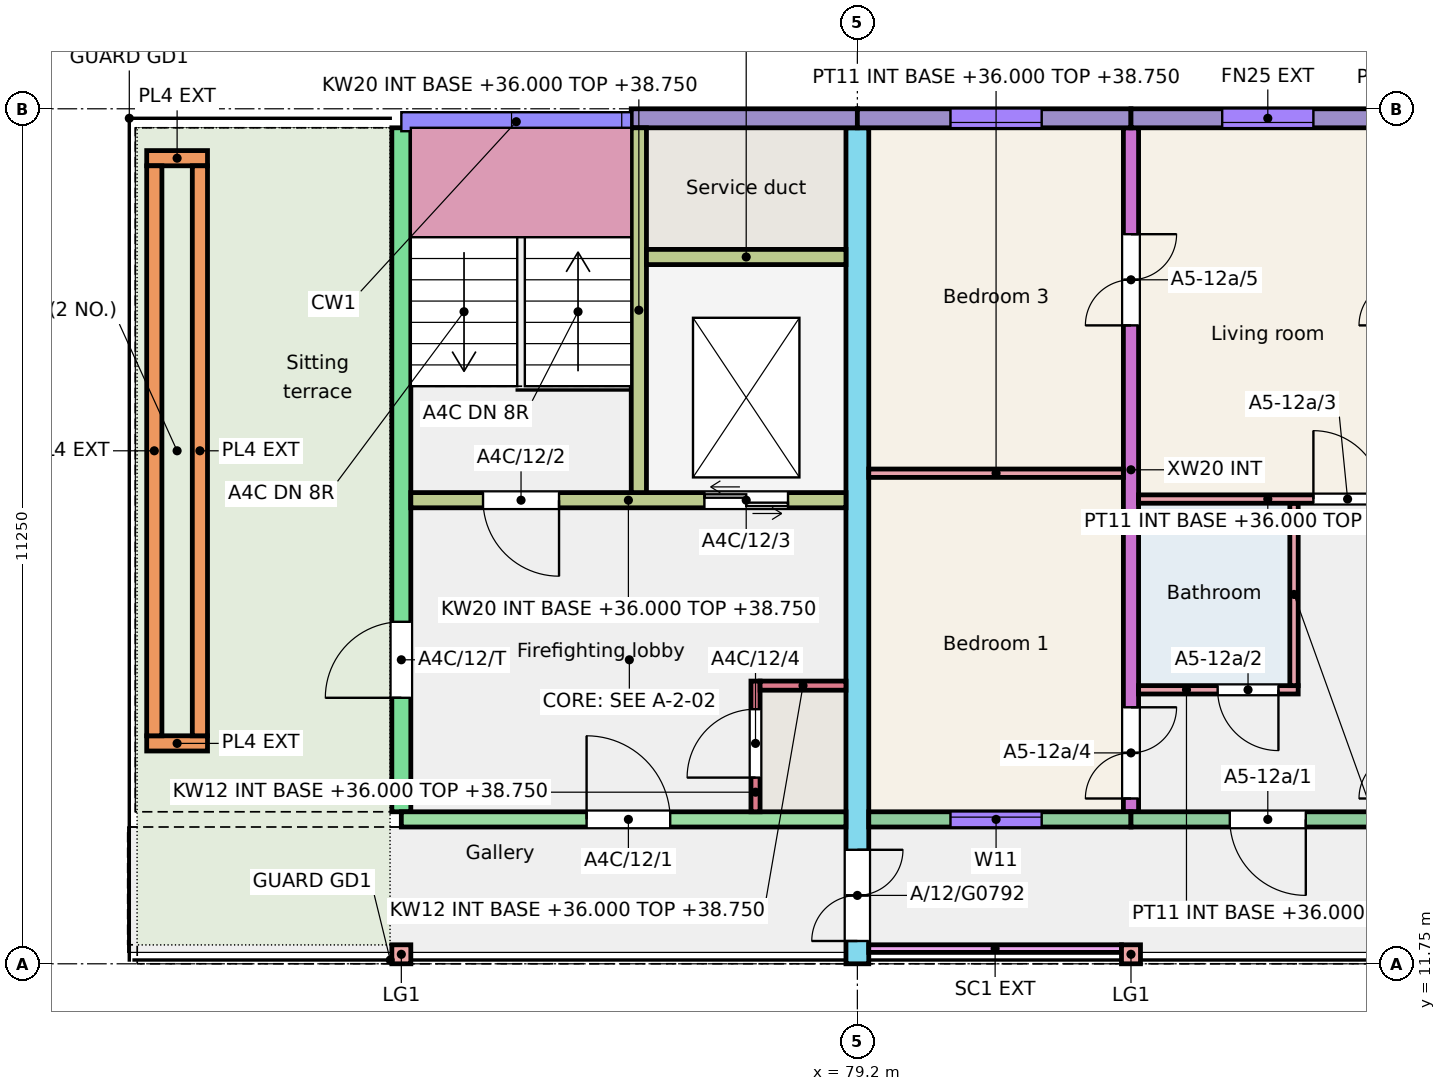
"""IFC4 building model, lengths in metres.
Left out: names, types, materials, properties, quantities, classifications, styles, units other than length and angle.
Written with IfcOpenShell. Run it as: python <this file> out.ifc"""

import sys

from ifc_helpers import new_model, si_unit, direction, frame, frame_2d, origin, origin_2d, place, context, subcontext, project, spatial, rectangle, extrude, element, fill, save


model = new_model("IFC4")
c1 = context("Model", 3, precision=1e-05, world=origin(), true_north=direction((0.0, 1.0)))
c2 = subcontext(c1, "Body", "Model", "MODEL_VIEW")
j1 = project(units=[si_unit("LENGTHUNIT", "METRE"), si_unit("PLANEANGLEUNIT", "RADIAN")], contexts=[c1])
p1 = place(None, origin())
s1 = spatial("IfcSite", under=j1, at=p1, CompositionType="ELEMENT")
p2 = place(p1, origin())
s2 = spatial("IfcBuilding", under=s1, at=p2, CompositionType="ELEMENT")
p3 = place(p2, frame((0.0, 0.0, 36.0)))
s3 = spatial("IfcBuildingStorey", under=s2, at=p3, CompositionType="ELEMENT", Elevation=36.0)
p4 = place(p3, frame((73.2, 13.75, 0.0), z_axis=(0.0, 0.0, 1.0), x_axis=(0.0, 1.0, 0.0)))
e1 = element("IfcWall", 1, at=p4, inside=s3, PredefinedType="SHEAR", context=c2, shape_type="SweptSolid", body=[
    extrude(rectangle(XDim=9.0, YDim=0.25, at=frame_2d((4.5, 0.0))), origin(), (0.0, 0.0, 1.0), 3.0),
])
p5 = place(p4, frame((1.5, 0.0, 0.0)))
e2 = element("IfcOpeningElement", 2, at=p5, cuts=e1, PredefinedType="OPENING", context=c2, shape_type="SweptSolid", body=[
    extrude(rectangle(XDim=1.0, YDim=2.1, at=frame_2d((0.5, 1.05))), frame((0.0, 0.135, 0.0), z_axis=(0.0, -1.0, 0.0), x_axis=(1.0, 0.0, 0.0)), (0.0, 0.0, 1.0), 0.27),
])
p6 = place(p3, frame((79.2, 11.75, 0.0), z_axis=(0.0, 0.0, 1.0), x_axis=(0.0, 1.0, 0.0)))
e3 = element("IfcWall", 3, at=p6, inside=s3, PredefinedType="SHEAR", context=c2, shape_type="SweptSolid", body=[
    extrude(rectangle(XDim=11.0, YDim=0.3, at=frame_2d((5.5, 0.0))), origin(), (0.0, 0.0, 1.0), 3.0),
])
p7 = place(p6, frame((0.3, 0.0, 0.0)))
e4 = element("IfcOpeningElement", 4, at=p7, cuts=e3, PredefinedType="OPENING", context=c2, shape_type="SweptSolid", body=[
    extrude(rectangle(XDim=1.2, YDim=2.1, at=frame_2d((0.6, 1.05))), frame((0.0, 0.16, 0.0), z_axis=(0.0, -1.0, 0.0), x_axis=(1.0, 0.0, 0.0)), (0.0, 0.0, 1.0), 0.32),
])
p8 = place(p3, frame((82.8, 13.75, 0.0), z_axis=(0.0, 0.0, 1.0), x_axis=(0.0, 1.0, 0.0)))
e5 = element("IfcWall", 5, at=p8, inside=s3, PredefinedType="SHEAR", context=c2, shape_type="SweptSolid", body=[
    extrude(rectangle(XDim=9.0, YDim=0.2, at=frame_2d((4.5, 0.0))), origin(), (0.0, 0.0, 1.0), 3.0),
])
p9 = place(p8, frame((0.175, 0.0, 0.0)))
e6 = element("IfcOpeningElement", 6, at=p9, cuts=e5, PredefinedType="OPENING", context=c2, shape_type="SweptSolid", body=[
    extrude(rectangle(XDim=1.2, YDim=2.1, at=frame_2d((0.6, 1.05))), frame((0.0, 0.11, 0.0), z_axis=(0.0, -1.0, 0.0), x_axis=(1.0, 0.0, 0.0)), (0.0, 0.0, 1.0), 0.22),
])
p10 = place(p8, frame((6.4, 0.0, 0.0)))
e7 = element("IfcOpeningElement", 7, at=p10, cuts=e5, PredefinedType="OPENING", context=c2, shape_type="SweptSolid", body=[
    extrude(rectangle(XDim=1.2, YDim=2.1, at=frame_2d((0.6, 1.05))), frame((0.0, 0.11, 0.0), z_axis=(0.0, -1.0, 0.0), x_axis=(1.0, 0.0, 0.0)), (0.0, 0.0, 1.0), 0.22),
])
p11 = place(p3, frame((76.225, 22.875, 0.0), z_axis=(0.0, 0.0, 1.0), x_axis=(1.0, 0.0, 0.0)))
e8 = element("IfcWall", 8, at=p11, inside=s3, PredefinedType="SOLIDWALL", context=c2, shape_type="SweptSolid", body=[
    extrude(rectangle(XDim=2.975, YDim=0.25, at=frame_2d((1.487, 0.0))), origin(), (0.0, 0.0, 1.0), 3.0),
])
p12 = place(p3, frame((73.2, 13.65, 0.0), z_axis=(0.0, 0.0, 1.0), x_axis=(1.0, 0.0, 0.0)))
e9 = element("IfcWall", 9, at=p12, inside=s3, PredefinedType="SHEAR", context=c2, shape_type="SweptSolid", body=[
    extrude(rectangle(XDim=5.85, YDim=0.2, at=frame_2d((2.925, 0.0))), origin(), (0.0, 0.0, 1.0), 2.75),
])
p13 = place(p12, frame((2.438, 0.0, 0.0)))
e10 = element("IfcOpeningElement", 10, at=p13, cuts=e9, PredefinedType="OPENING", context=c2, shape_type="SweptSolid", body=[
    extrude(rectangle(XDim=1.1, YDim=2.1, at=frame_2d((0.55, 1.05))), frame((0.0, 0.11, 0.0), z_axis=(0.0, -1.0, 0.0), x_axis=(1.0, 0.0, 0.0)), (0.0, 0.0, 1.0), 0.22),
])
p14 = place(p3, frame((73.325, 17.85, 0.0), z_axis=(0.0, 0.0, 1.0), x_axis=(1.0, 0.0, 0.0)))
e11 = element("IfcWall", 11, at=p14, inside=s3, PredefinedType="SHEAR", context=c2, shape_type="SweptSolid", body=[
    extrude(rectangle(XDim=5.725, YDim=0.2, at=frame_2d((2.863, 0.0))), origin(), (0.0, 0.0, 1.0), 2.75),
])
p15 = place(p14, frame((0.95, 0.0, 0.0)))
e12 = element("IfcOpeningElement", 12, at=p15, cuts=e11, PredefinedType="OPENING", context=c2, shape_type="SweptSolid", body=[
    extrude(rectangle(XDim=1.0, YDim=2.1, at=frame_2d((0.5, 1.05))), frame((0.0, 0.11, 0.0), z_axis=(0.0, -1.0, 0.0), x_axis=(1.0, 0.0, 0.0)), (0.0, 0.0, 1.0), 0.22),
])
p16 = place(p14, frame((3.863, 0.0, 0.0)))
e13 = element("IfcOpeningElement", 13, at=p16, cuts=e11, PredefinedType="OPENING", context=c2, shape_type="SweptSolid", body=[
    extrude(rectangle(XDim=1.1, YDim=2.1, at=frame_2d((0.55, 1.05))), frame((0.0, 0.11, 0.0), z_axis=(0.0, -1.0, 0.0), x_axis=(1.0, 0.0, 0.0)), (0.0, 0.0, 1.0), 0.22),
])
p17 = place(p3, frame((76.325, 17.95, 0.0), z_axis=(0.0, 0.0, 1.0), x_axis=(0.0, 1.0, 0.0)))
e14 = element("IfcWall", 14, at=p17, inside=s3, PredefinedType="SHEAR", context=c2, shape_type="SweptSolid", body=[
    extrude(rectangle(XDim=4.8, YDim=0.2, at=frame_2d((2.4, 0.0))), origin(), (0.0, 0.0, 1.0), 2.75),
])
p18 = place(p3, frame((76.425, 21.05, 0.0), z_axis=(0.0, 0.0, 1.0), x_axis=(1.0, 0.0, 0.0)))
e15 = element("IfcWall", 15, at=p18, inside=s3, PredefinedType="SHEAR", context=c2, shape_type="SweptSolid", body=[
    extrude(rectangle(XDim=2.625, YDim=0.2, at=frame_2d((1.312, 0.0))), origin(), (0.0, 0.0, 1.0), 2.75),
])
p19 = place(p3, frame((77.86, 13.75, 0.0), z_axis=(0.0, 0.0, 1.0), x_axis=(0.0, 1.0, 0.0)))
e16 = element("IfcWall", 16, at=p19, inside=s3, PredefinedType="SHEAR", context=c2, shape_type="SweptSolid", body=[
    extrude(rectangle(XDim=1.72, YDim=0.12, at=frame_2d((0.86, 0.0))), origin(), (0.0, 0.0, 1.0), 2.75),
])
p20 = place(p19, frame((0.45, 0.0, 0.0)))
e17 = element("IfcOpeningElement", 17, at=p20, cuts=e16, PredefinedType="OPENING", context=c2, shape_type="SweptSolid", body=[
    extrude(rectangle(XDim=0.9, YDim=2.1, at=frame_2d((0.45, 1.05))), frame((0.0, 0.07, 0.0), z_axis=(0.0, -1.0, 0.0), x_axis=(1.0, 0.0, 0.0)), (0.0, 0.0, 1.0), 0.14),
])
p21 = place(p3, frame((77.92, 15.41, 0.0), z_axis=(0.0, 0.0, 1.0), x_axis=(1.0, 0.0, 0.0)))
e18 = element("IfcWall", 18, at=p21, inside=s3, PredefinedType="SHEAR", context=c2, shape_type="SweptSolid", body=[
    extrude(rectangle(XDim=1.13, YDim=0.12, at=frame_2d((0.565, 0.0))), origin(), (0.0, 0.0, 1.0), 2.75),
])
p22 = place(p3, frame((79.2, 22.875, 0.0), z_axis=(0.0, 0.0, 1.0), x_axis=(1.0, 0.0, 0.0)))
e19 = element("IfcWall", 19, at=p22, inside=s3, PredefinedType="SOLIDWALL", context=c2, shape_type="SweptSolid", body=[
    extrude(rectangle(XDim=3.6, YDim=0.25, at=frame_2d((1.8, 0.0))), origin(), (0.0, 0.0, 1.0), 3.0),
])
p23 = place(p22, frame((1.225, 0.0, 0.8)))
e20 = element("IfcOpeningElement", 20, at=p23, cuts=e19, PredefinedType="OPENING", context=c2, shape_type="SweptSolid", body=[
    extrude(rectangle(XDim=1.2, YDim=1.6, at=frame_2d((0.6, 0.8))), frame((0.0, 0.135, 0.0), z_axis=(0.0, -1.0, 0.0), x_axis=(1.0, 0.0, 0.0)), (0.0, 0.0, 1.0), 0.27),
])
p24 = place(p3, frame((79.35, 13.65, 0.0), z_axis=(0.0, 0.0, 1.0), x_axis=(1.0, 0.0, 0.0)))
e21 = element("IfcWall", 21, at=p24, inside=s3, PredefinedType="SOLIDWALL", context=c2, shape_type="SweptSolid", body=[
    extrude(rectangle(XDim=3.45, YDim=0.2, at=frame_2d((1.725, 0.0))), origin(), (0.0, 0.0, 1.0), 3.0),
])
p25 = place(p24, frame((1.075, 0.0, 0.8)))
e22 = element("IfcOpeningElement", 22, at=p25, cuts=e21, PredefinedType="OPENING", context=c2, shape_type="SweptSolid", body=[
    extrude(rectangle(XDim=1.2, YDim=1.6, at=frame_2d((0.6, 0.8))), frame((0.0, 0.11, 0.0), z_axis=(0.0, -1.0, 0.0), x_axis=(1.0, 0.0, 0.0)), (0.0, 0.0, 1.0), 0.22),
])
p26 = place(p3, frame((82.8, 22.875, 0.0), z_axis=(0.0, 0.0, 1.0), x_axis=(1.0, 0.0, 0.0)))
e23 = element("IfcWall", 23, at=p26, inside=s3, PredefinedType="SOLIDWALL", context=c2, shape_type="SweptSolid", body=[
    extrude(rectangle(XDim=3.6, YDim=0.25, at=frame_2d((1.8, 0.0))), origin(), (0.0, 0.0, 1.0), 3.0),
])
p27 = place(p26, frame((1.2, 0.0, 0.8)))
e24 = element("IfcOpeningElement", 24, at=p27, cuts=e23, PredefinedType="OPENING", context=c2, shape_type="SweptSolid", body=[
    extrude(rectangle(XDim=1.2, YDim=1.6, at=frame_2d((0.6, 0.8))), frame((0.0, 0.135, 0.0), z_axis=(0.0, -1.0, 0.0), x_axis=(1.0, 0.0, 0.0)), (0.0, 0.0, 1.0), 0.27),
])
p28 = place(p3, frame((82.8, 13.65, 0.0), z_axis=(0.0, 0.0, 1.0), x_axis=(1.0, 0.0, 0.0)))
e25 = element("IfcWall", 25, at=p28, inside=s3, PredefinedType="SOLIDWALL", context=c2, shape_type="SweptSolid", body=[
    extrude(rectangle(XDim=3.6, YDim=0.2, at=frame_2d((1.8, 0.0))), origin(), (0.0, 0.0, 1.0), 3.0),
])
p29 = place(p28, frame((1.3, 0.0, 0.0)))
e26 = element("IfcOpeningElement", 26, at=p29, cuts=e25, PredefinedType="OPENING", context=c2, shape_type="SweptSolid", body=[
    extrude(rectangle(XDim=1.0, YDim=2.1, at=frame_2d((0.5, 1.05))), frame((0.0, 0.11, 0.0), z_axis=(0.0, -1.0, 0.0), x_axis=(1.0, 0.0, 0.0)), (0.0, 0.0, 1.0), 0.22),
])
for number, where, z_axis, x_axis in (
    (27, (73.2, 11.875, 0.0), (0.0, 0.0, 1.0), (1.0, 0.0, 0.0)),
    (28, (82.8, 11.875, 0.0), (0.0, 0.0, 1.0), (1.0, 0.0, 0.0)),
):
    element("IfcColumn", number, at=place(p3, frame(where, z_axis=z_axis, x_axis=x_axis)), inside=s3, PredefinedType="COLUMN", context=c2, shape_type="SweptSolid", body=[
        extrude(rectangle(XDim=0.25, YDim=0.25, at=origin_2d()), origin(), (0.0, 0.0, 1.0), 3.0),
    ])
for number, where, z_axis, x_axis in (
    (29, (69.85, 14.65, 0.01), (0.0, 0.0, 1.0), (1.0, 0.0, 0.0)),
    (30, (69.85, 22.35, 0.01), (0.0, 0.0, 1.0), (1.0, 0.0, 0.0)),
):
    element("IfcWall", number, at=place(p3, frame(where, z_axis=z_axis, x_axis=x_axis)), inside=s3, PredefinedType="SOLIDWALL", context=c2, shape_type="SweptSolid", body=[
        extrude(rectangle(XDim=0.8, YDim=0.2, at=frame_2d((0.4, 0.0))), origin(), (0.0, 0.0, 1.0), 0.45),
    ])
for number, where, z_axis, x_axis in (
    (31, (69.95, 14.75, 0.01), (0.0, 0.0, 1.0), (0.0, 1.0, 0.0)),
    (32, (70.55, 14.75, 0.01), (0.0, 0.0, 1.0), (0.0, 1.0, 0.0)),
):
    element("IfcWall", number, at=place(p3, frame(where, z_axis=z_axis, x_axis=x_axis)), inside=s3, PredefinedType="SOLIDWALL", context=c2, shape_type="SweptSolid", body=[
        extrude(rectangle(XDim=7.5, YDim=0.2, at=frame_2d((3.75, 0.0))), origin(), (0.0, 0.0, 1.0), 0.45),
    ])
p30 = place(p3, frame((79.35, 11.95, 0.0), z_axis=(0.0, 0.0, 1.0), x_axis=(1.0, 0.0, 0.0)))
e33 = element("IfcWall", 33, at=p30, inside=s3, PredefinedType="SOLIDWALL", context=c2, shape_type="SweptSolid", body=[
    extrude(rectangle(XDim=3.325, YDim=0.1, at=frame_2d((1.663, 0.0))), origin(), (0.0, 0.0, 1.0), 2.45),
])
p31 = place(p3, frame((82.9, 15.355, 0.0), z_axis=(0.0, 0.0, 1.0), x_axis=(1.0, 0.0, 0.0)))
e34 = element("IfcWall", 34, at=p31, inside=s3, PredefinedType="PARTITIONING", context=c2, shape_type="SweptSolid", body=[
    extrude(rectangle(XDim=2.1, YDim=0.11, at=frame_2d((1.05, 0.0))), origin(), (0.0, 0.0, 1.0), 2.8),
])
p32 = place(p31, frame((1.04, 0.0, 0.0)))
e35 = element("IfcOpeningElement", 35, at=p32, cuts=e34, PredefinedType="OPENING", context=c2, shape_type="SweptSolid", body=[
    extrude(rectangle(XDim=0.8, YDim=2.1, at=frame_2d((0.4, 1.05))), frame((0.0, 0.065, 0.0), z_axis=(0.0, -1.0, 0.0), x_axis=(1.0, 0.0, 0.0)), (0.0, 0.0, 1.0), 0.13),
])
p33 = place(p3, frame((84.945, 15.41, 0.0), z_axis=(0.0, 0.0, 1.0), x_axis=(0.0, 1.0, 0.0)))
e36 = element("IfcWall", 36, at=p33, inside=s3, PredefinedType="PARTITIONING", context=c2, shape_type="SweptSolid", body=[
    extrude(rectangle(XDim=2.4, YDim=0.11, at=frame_2d((1.2, 0.0))), origin(), (0.0, 0.0, 1.0), 2.8),
])
p34 = place(p3, frame((82.9, 17.865, 0.0), z_axis=(0.0, 0.0, 1.0), x_axis=(1.0, 0.0, 0.0)))
e37 = element("IfcWall", 37, at=p34, inside=s3, PredefinedType="PARTITIONING", context=c2, shape_type="SweptSolid", body=[
    extrude(rectangle(XDim=3.4, YDim=0.11, at=frame_2d((1.7, 0.0))), origin(), (0.0, 0.0, 1.0), 2.8),
])
p35 = place(p34, frame((2.3, 0.0, 0.0)))
e38 = element("IfcOpeningElement", 38, at=p35, cuts=e37, PredefinedType="OPENING", context=c2, shape_type="SweptSolid", body=[
    extrude(rectangle(XDim=0.9, YDim=2.1, at=frame_2d((0.45, 1.05))), frame((0.0, 0.065, 0.0), z_axis=(0.0, -1.0, 0.0), x_axis=(1.0, 0.0, 0.0)), (0.0, 0.0, 1.0), 0.13),
])
p36 = place(p3, frame((79.35, 18.205, 0.0), z_axis=(0.0, 0.0, 1.0), x_axis=(1.0, 0.0, 0.0)))
e39 = element("IfcWall", 39, at=p36, inside=s3, PredefinedType="PARTITIONING", context=c2, shape_type="SweptSolid", body=[
    extrude(rectangle(XDim=3.35, YDim=0.11, at=frame_2d((1.675, 0.0))), origin(), (0.0, 0.0, 1.0), 2.75),
])
p37 = place(p25, origin())
e40 = element("IfcWindow", 40, at=p37, inside=s3, PartitioningType="SINGLE_PANEL", PredefinedType="WINDOW", context=c2, shape_type="SweptSolid", body=[
    extrude(rectangle(XDim=1.2, YDim=1.6, at=frame_2d((0.6, 0.8))), frame((0.0, 0.06, 0.0), z_axis=(0.0, -1.0, 0.0), x_axis=(1.0, 0.0, 0.0)), (0.0, 0.0, 1.0), 0.06),
])
fill(e22, e40)
p38 = place(p23, origin())
e41 = element("IfcWindow", 41, at=p38, inside=s3, PartitioningType="SINGLE_PANEL", PredefinedType="WINDOW", context=c2, shape_type="SweptSolid", body=[
    extrude(rectangle(XDim=1.2, YDim=1.6, at=frame_2d((0.6, 0.8))), frame((0.0, -0.025, 0.0), z_axis=(0.0, -1.0, 0.0), x_axis=(1.0, 0.0, 0.0)), (0.0, 0.0, 1.0), 0.06),
])
fill(e20, e41)
p39 = place(p27, origin())
e42 = element("IfcWindow", 42, at=p39, inside=s3, PartitioningType="SINGLE_PANEL", PredefinedType="WINDOW", context=c2, shape_type="SweptSolid", body=[
    extrude(rectangle(XDim=1.2, YDim=1.6, at=frame_2d((0.6, 0.8))), frame((0.0, -0.025, 0.0), z_axis=(0.0, -1.0, 0.0), x_axis=(1.0, 0.0, 0.0)), (0.0, 0.0, 1.0), 0.06),
])
fill(e24, e42)
p40 = place(p29, origin())
e43 = element("IfcDoor", 43, at=p40, inside=s3, OperationType="SINGLE_SWING_RIGHT", PredefinedType="DOOR", context=c2, shape_type="SweptSolid", body=[
    extrude(rectangle(XDim=1.0, YDim=2.1, at=frame_2d((0.5, 1.05))), frame((0.0, 0.025, 0.0), z_axis=(0.0, -1.0, 0.0), x_axis=(1.0, 0.0, 0.0)), (0.0, 0.0, 1.0), 0.05),
])
fill(e26, e43)
p41 = place(p32, origin())
e44 = element("IfcDoor", 44, at=p41, inside=s3, OperationType="SINGLE_SWING_RIGHT", PredefinedType="DOOR", context=c2, shape_type="SweptSolid", body=[
    extrude(rectangle(XDim=0.8, YDim=2.1, at=frame_2d((0.4, 1.05))), frame((0.0, 0.025, 0.0), z_axis=(0.0, -1.0, 0.0), x_axis=(1.0, 0.0, 0.0)), (0.0, 0.0, 1.0), 0.05),
])
fill(e35, e44)
p42 = place(p35, origin())
e45 = element("IfcDoor", 45, at=p42, inside=s3, OperationType="SINGLE_SWING_LEFT", PredefinedType="DOOR", context=c2, shape_type="SweptSolid", body=[
    extrude(rectangle(XDim=0.9, YDim=2.1, at=frame_2d((0.45, 1.05))), frame((0.0, 0.025, 0.0), z_axis=(0.0, -1.0, 0.0), x_axis=(1.0, 0.0, 0.0)), (0.0, 0.0, 1.0), 0.05),
])
fill(e38, e45)
p43 = place(p9, origin())
e46 = element("IfcDoor", 46, at=p43, inside=s3, OperationType="DOUBLE_DOOR_SINGLE_SWING", PredefinedType="DOOR", context=c2, shape_type="SweptSolid", body=[
    extrude(rectangle(XDim=1.2, YDim=2.1, at=frame_2d((0.6, 1.05))), frame((0.0, 0.025, 0.0), z_axis=(0.0, -1.0, 0.0), x_axis=(1.0, 0.0, 0.0)), (0.0, 0.0, 1.0), 0.05),
])
fill(e6, e46)
p44 = place(p10, origin())
e47 = element("IfcDoor", 47, at=p44, inside=s3, OperationType="DOUBLE_DOOR_SINGLE_SWING", PredefinedType="DOOR", context=c2, shape_type="SweptSolid", body=[
    extrude(rectangle(XDim=1.2, YDim=2.1, at=frame_2d((0.6, 1.05))), frame((0.0, 0.025, 0.0), z_axis=(0.0, -1.0, 0.0), x_axis=(1.0, 0.0, 0.0)), (0.0, 0.0, 1.0), 0.05),
])
fill(e7, e47)
p45 = place(p13, origin())
e48 = element("IfcDoor", 48, at=p45, inside=s3, OperationType="SINGLE_SWING_LEFT", PredefinedType="DOOR", context=c2, shape_type="SweptSolid", body=[
    extrude(rectangle(XDim=1.1, YDim=2.1, at=frame_2d((0.55, 1.05))), frame((0.0, 0.025, 0.0), z_axis=(0.0, -1.0, 0.0), x_axis=(1.0, 0.0, 0.0)), (0.0, 0.0, 1.0), 0.05),
])
fill(e10, e48)
p46 = place(p15, origin())
e49 = element("IfcDoor", 49, at=p46, inside=s3, OperationType="SINGLE_SWING_RIGHT", PredefinedType="DOOR", context=c2, shape_type="SweptSolid", body=[
    extrude(rectangle(XDim=1.0, YDim=2.1, at=frame_2d((0.5, 1.05))), frame((0.0, 0.025, 0.0), z_axis=(0.0, -1.0, 0.0), x_axis=(1.0, 0.0, 0.0)), (0.0, 0.0, 1.0), 0.05),
])
fill(e12, e49)
p47 = place(p16, origin())
e50 = element("IfcDoor", 50, at=p47, inside=s3, OperationType="DOUBLE_DOOR_SLIDING", PredefinedType="DOOR", context=c2, shape_type="SweptSolid", body=[
    extrude(rectangle(XDim=1.1, YDim=2.1, at=frame_2d((0.55, 1.05))), frame((0.0, 0.025, 0.0), z_axis=(0.0, -1.0, 0.0), x_axis=(1.0, 0.0, 0.0)), (0.0, 0.0, 1.0), 0.05),
])
fill(e13, e50)
p48 = place(p20, origin())
e51 = element("IfcDoor", 51, at=p48, inside=s3, OperationType="SINGLE_SWING_LEFT", PredefinedType="DOOR", context=c2, shape_type="SweptSolid", body=[
    extrude(rectangle(XDim=0.9, YDim=2.1, at=frame_2d((0.45, 1.05))), frame((0.0, 0.025, 0.0), z_axis=(0.0, -1.0, 0.0), x_axis=(1.0, 0.0, 0.0)), (0.0, 0.0, 1.0), 0.05),
])
fill(e17, e51)
p49 = place(p5, origin())
e52 = element("IfcDoor", 52, at=p49, inside=s3, OperationType="SINGLE_SWING_LEFT", PredefinedType="DOOR", context=c2, shape_type="SweptSolid", body=[
    extrude(rectangle(XDim=1.0, YDim=2.1, at=frame_2d((0.5, 1.05))), frame((0.0, 0.025, 0.0), z_axis=(0.0, -1.0, 0.0), x_axis=(1.0, 0.0, 0.0)), (0.0, 0.0, 1.0), 0.05),
])
fill(e2, e52)
p50 = place(p7, origin())
e53 = element("IfcDoor", 53, at=p50, inside=s3, OperationType="DOUBLE_DOOR_SINGLE_SWING", PredefinedType="DOOR", context=c2, shape_type="SweptSolid", body=[
    extrude(rectangle(XDim=1.2, YDim=2.1, at=frame_2d((0.6, 1.05))), frame((0.0, 0.025, 0.0), z_axis=(0.0, -1.0, 0.0), x_axis=(1.0, 0.0, 0.0)), (0.0, 0.0, 1.0), 0.05),
])
fill(e4, e53)
save(model, sys.argv[1])
